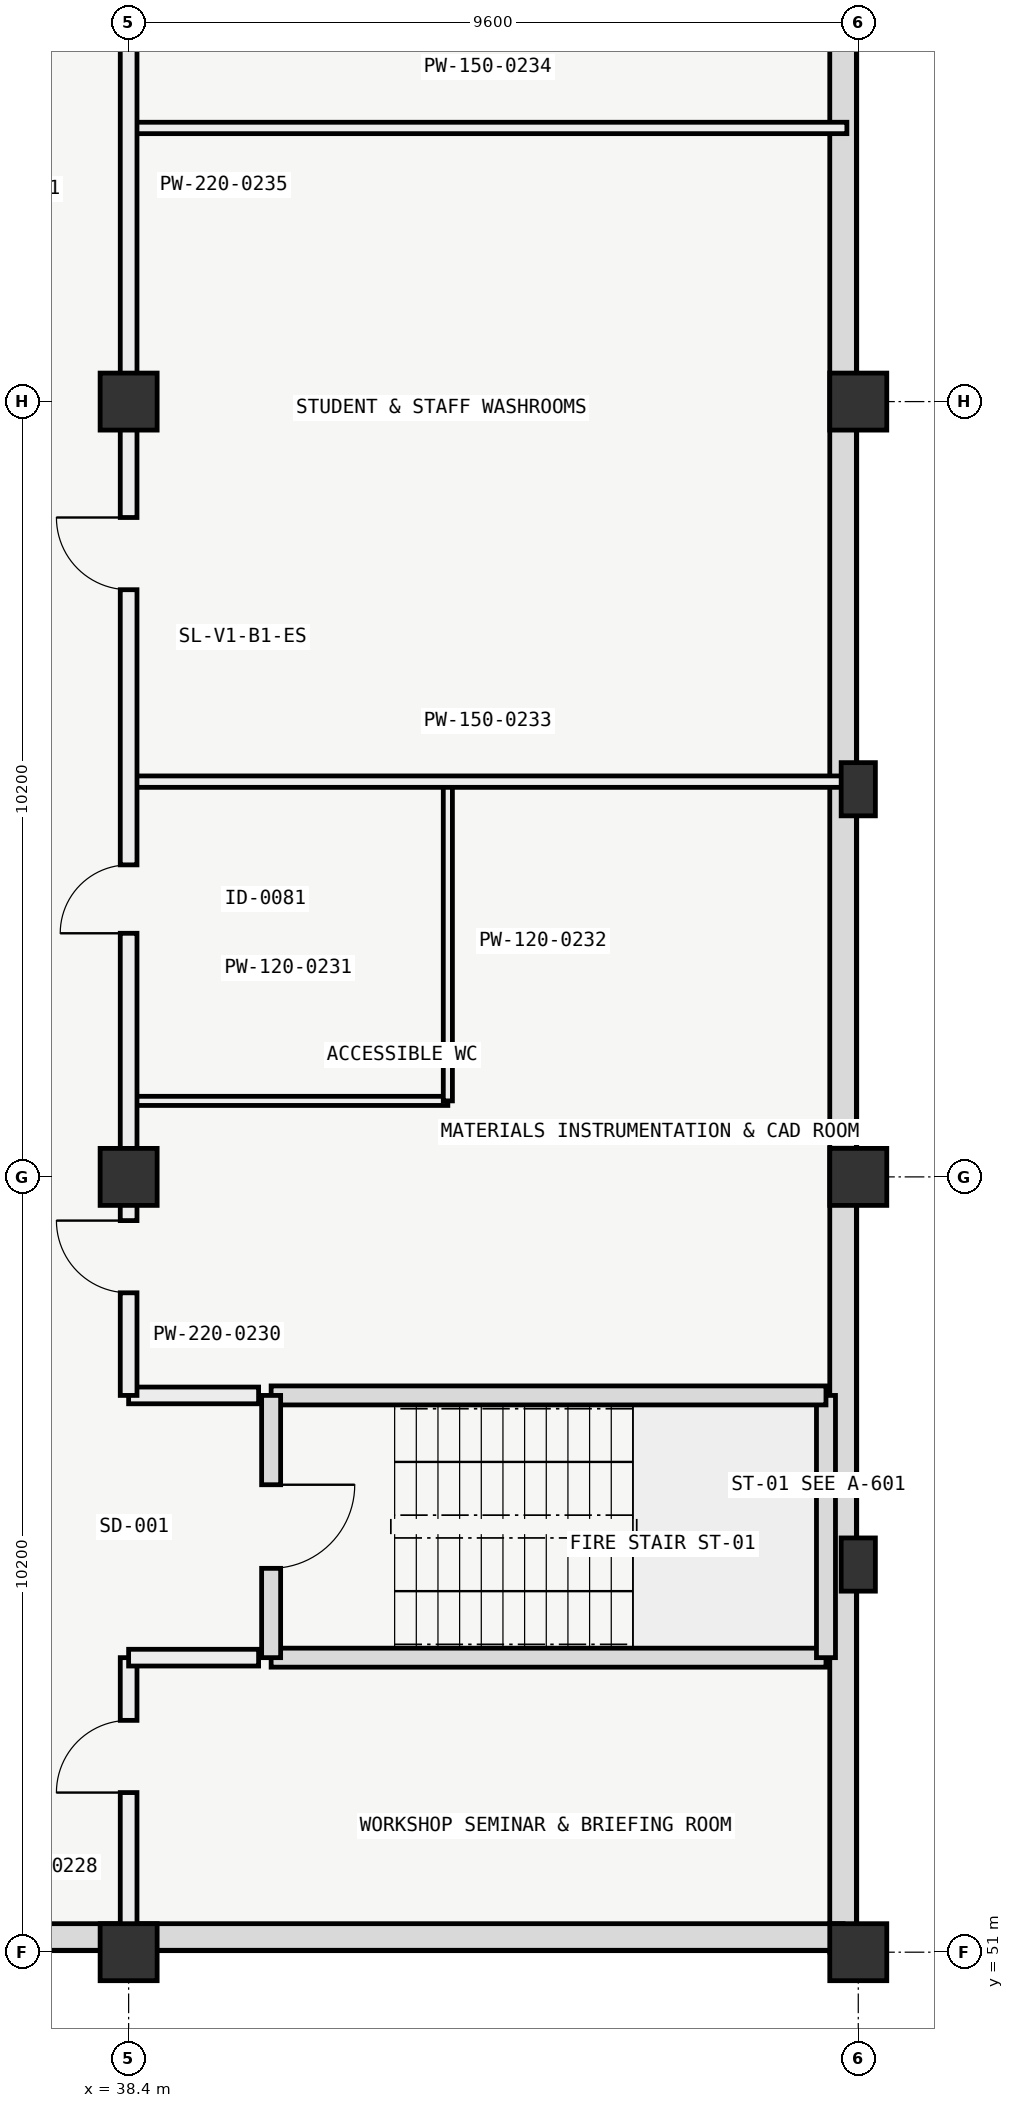
"""IFC4 building model, lengths in metres.
Left out: names, types, materials, properties, quantities, classifications, styles, units other than length and angle.
Written with IfcOpenShell. Run it as: python <this file> out.ifc"""

import sys

from ifc_helpers import new_model, si_unit, direction, frame, frame_2d, origin, origin_2d, place, context, subcontext, project, spatial, rectangle, extrude, element, fill, save


model = new_model("IFC4")
c1 = context("Model", 3, precision=1e-05, world=origin(), true_north=direction((0.0, 1.0)))
c2 = subcontext(c1, "Body", "Model", "MODEL_VIEW")
j1 = project(units=[si_unit("LENGTHUNIT", "METRE"), si_unit("PLANEANGLEUNIT", "RADIAN")], contexts=[c1])
p1 = place(None, origin())
s1 = spatial("IfcSite", under=j1, at=p1, CompositionType="ELEMENT")
p2 = place(p1, origin())
s2 = spatial("IfcBuilding", under=s1, at=p2, CompositionType="ELEMENT")
p3 = place(p2, frame((0.0, 0.0, -4.2)))
s3 = spatial("IfcBuildingStorey", under=s2, at=p3, CompositionType="ELEMENT", Elevation=-4.2)
for number, where, z_axis, x_axis in (
    (1, (38.4, 51.0, 0.0), (0.0, 0.0, 1.0), (1.0, 0.0, 0.0)),
    (2, (48.0, 51.0, 0.0), (0.0, 0.0, 1.0), (1.0, 0.0, 0.0)),
    (3, (38.4, 61.2, 0.0), (0.0, 0.0, 1.0), (1.0, 0.0, 0.0)),
    (4, (48.0, 61.2, 0.0), (0.0, 0.0, 1.0), (1.0, 0.0, 0.0)),
    (5, (38.4, 71.4, 0.0), (0.0, 0.0, 1.0), (1.0, 0.0, 0.0)),
    (6, (48.0, 71.4, 0.0), (0.0, 0.0, 1.0), (1.0, 0.0, 0.0)),
):
    element("IfcColumn", number, at=place(p3, frame(where, z_axis=z_axis, x_axis=x_axis)), inside=s3, PredefinedType="COLUMN", context=c2, shape_type="SweptSolid", body=[
        extrude(rectangle(XDim=0.75, YDim=0.75, at=origin_2d()), origin(), (0.0, 0.0, 1.0), 4.2),
    ])
for number, where, z_axis, x_axis in (
    (7, (48.0, 56.1, 0.0), (0.0, 0.0, 1.0), (1.0, 0.0, 0.0)),
    (8, (48.0, 66.3, 0.0), (0.0, 0.0, 1.0), (1.0, 0.0, 0.0)),
):
    element("IfcColumn", number, at=place(p3, frame(where, z_axis=z_axis, x_axis=x_axis)), inside=s3, PredefinedType="PILASTER", context=c2, shape_type="SweptSolid", body=[
        extrude(rectangle(XDim=0.45, YDim=0.7, at=origin_2d()), origin(), (0.0, 0.0, 1.0), 4.2),
    ])
p4 = place(p3, frame((47.8, 51.0, 0.0), z_axis=(0.0, 0.0, 1.0), x_axis=(0.0, 1.0, 0.0)))
e9 = element("IfcWall", 9, at=p4, inside=s3, PredefinedType="USERDEFINED", context=c2, shape_type="SweptSolid", body=[
    extrude(rectangle(XDim=71.4, YDim=0.35, at=frame_2d((35.7, 0.0))), origin(), (0.0, 0.0, 1.0), 3.9),
])
p5 = place(p3, frame((0.2, 51.2, 0.0), z_axis=(0.0, 0.0, 1.0), x_axis=(1.0, 0.0, 0.0)))
e10 = element("IfcWall", 10, at=p5, inside=s3, PredefinedType="USERDEFINED", context=c2, shape_type="SweptSolid", body=[
    extrude(rectangle(XDim=47.6, YDim=0.35, at=frame_2d((23.8, 0.0))), origin(), (0.0, 0.0, 1.0), 3.9),
])
p6 = place(p3, frame((40.275, 54.875, 0.0), z_axis=(0.0, 0.0, 1.0), x_axis=(1.0, 0.0, 0.0)))
e11 = element("IfcWall", 11, at=p6, inside=s3, PredefinedType="SOLIDWALL", context=c2, shape_type="SweptSolid", body=[
    extrude(rectangle(XDim=7.3, YDim=0.25, at=frame_2d((3.65, 0.0))), origin(), (0.0, 0.0, 1.0), 3.9),
])
p7 = place(p3, frame((47.575, 54.875, 0.0), z_axis=(0.0, 0.0, 1.0), x_axis=(0.0, 1.0, 0.0)))
e12 = element("IfcWall", 12, at=p7, inside=s3, PredefinedType="SOLIDWALL", context=c2, shape_type="SweptSolid", body=[
    extrude(rectangle(XDim=3.45, YDim=0.25, at=frame_2d((1.725, 0.0))), origin(), (0.0, 0.0, 1.0), 3.9),
])
p8 = place(p3, frame((47.575, 58.325, 0.0), z_axis=(0.0, 0.0, 1.0), x_axis=(-1.0, 0.0, 0.0)))
e13 = element("IfcWall", 13, at=p8, inside=s3, PredefinedType="SOLIDWALL", context=c2, shape_type="SweptSolid", body=[
    extrude(rectangle(XDim=7.3, YDim=0.25, at=frame_2d((3.65, 0.0))), origin(), (0.0, 0.0, 1.0), 3.9),
])
p9 = place(p3, frame((40.275, 58.325, 0.0), z_axis=(0.0, 0.0, 1.0), x_axis=(0.0, -1.0, 0.0)))
e14 = element("IfcWall", 14, at=p9, inside=s3, PredefinedType="SOLIDWALL", context=c2, shape_type="SweptSolid", body=[
    extrude(rectangle(XDim=3.45, YDim=0.25, at=frame_2d((1.725, 0.0))), origin(), (0.0, 0.0, 1.0), 3.9),
])
p10 = place(p9, frame((1.175, 0.0, 0.0)))
e15 = element("IfcOpeningElement", 15, at=p10, cuts=e14, PredefinedType="OPENING", context=c2, shape_type="SweptSolid", body=[
    extrude(rectangle(XDim=1.1, YDim=2.2, at=frame_2d((0.55, 1.1))), frame((0.0, 0.135, 0.0), z_axis=(0.0, -1.0, 0.0), x_axis=(1.0, 0.0, 0.0)), (0.0, 0.0, 1.0), 0.27),
])
p11 = place(p3, frame((38.4, 51.15, 0.0), z_axis=(0.0, 0.0, 1.0), x_axis=(0.0, 1.0, 0.0)))
e16 = element("IfcWall", 16, at=p11, inside=s3, PredefinedType="PARTITIONING", context=c2, shape_type="SweptSolid", body=[
    extrude(rectangle(XDim=3.725, YDim=0.22, at=frame_2d((1.863, 0.0))), origin(), (0.0, 0.0, 1.0), 3.423),
])
p12 = place(p11, frame((1.95, 0.0, 0.0)))
e17 = element("IfcOpeningElement", 17, at=p12, cuts=e16, PredefinedType="OPENING", context=c2, shape_type="SweptSolid", body=[
    extrude(rectangle(XDim=0.95, YDim=2.1, at=frame_2d((0.475, 1.05))), frame((0.0, 0.12, 0.0), z_axis=(0.0, -1.0, 0.0), x_axis=(1.0, 0.0, 0.0)), (0.0, 0.0, 1.0), 0.24),
])
for number, where, z_axis, x_axis in (
    (18, (38.4, 54.875, 0.0), (0.0, 0.0, 1.0), (1.0, 0.0, 0.0)),
    (19, (38.4, 58.325, 0.0), (0.0, 0.0, 1.0), (1.0, 0.0, 0.0)),
):
    element("IfcWall", number, at=place(p3, frame(where, z_axis=z_axis, x_axis=x_axis)), inside=s3, PredefinedType="PARTITIONING", context=c2, shape_type="SweptSolid", body=[
        extrude(rectangle(XDim=1.71, YDim=0.22, at=frame_2d((0.855, 0.0))), origin(), (0.0, 0.0, 1.0), 3.423),
    ])
p13 = place(p3, frame((38.4, 62.2, 0.0), z_axis=(0.0, 0.0, 1.0), x_axis=(1.0, 0.0, 0.0)))
e20 = element("IfcWall", 20, at=p13, inside=s3, PredefinedType="PARTITIONING", context=c2, shape_type="SweptSolid", body=[
    extrude(rectangle(XDim=4.2, YDim=0.12, at=frame_2d((2.1, 0.0))), origin(), (0.0, 0.0, 1.0), 3.423),
])
p14 = place(p3, frame((42.6, 62.2, 0.0), z_axis=(0.0, 0.0, 1.0), x_axis=(0.0, 1.0, 0.0)))
e21 = element("IfcWall", 21, at=p14, inside=s3, PredefinedType="PARTITIONING", context=c2, shape_type="SweptSolid", body=[
    extrude(rectangle(XDim=4.2, YDim=0.12, at=frame_2d((2.1, 0.0))), origin(), (0.0, 0.0, 1.0), 3.576),
])
for number, where, z_axis, x_axis in (
    (22, (38.4, 66.4, 0.0), (0.0, 0.0, 1.0), (1.0, 0.0, 0.0)),
    (23, (38.4, 75.0, 0.0), (0.0, 0.0, 1.0), (1.0, 0.0, 0.0)),
):
    element("IfcWall", number, at=place(p3, frame(where, z_axis=z_axis, x_axis=x_axis)), inside=s3, PredefinedType="PARTITIONING", context=c2, shape_type="SweptSolid", body=[
        extrude(rectangle(XDim=9.45, YDim=0.15, at=frame_2d((4.725, 0.0))), origin(), (0.0, 0.0, 1.0), 3.423),
    ])
p15 = place(p3, frame((38.4, 58.325, 0.0), z_axis=(0.0, 0.0, 1.0), x_axis=(0.0, 1.0, 0.0)))
e24 = element("IfcWall", 24, at=p15, inside=s3, PredefinedType="PARTITIONING", context=c2, shape_type="SweptSolid", body=[
    extrude(rectangle(XDim=26.7, YDim=0.22, at=frame_2d((13.35, 0.0))), origin(), (0.0, 0.0, 1.0), 3.268),
])
p16 = place(p15, frame((1.35, 0.0, 0.0)))
e25 = element("IfcOpeningElement", 25, at=p16, cuts=e24, PredefinedType="OPENING", context=c2, shape_type="SweptSolid", body=[
    extrude(rectangle(XDim=0.95, YDim=2.1, at=frame_2d((0.475, 1.05))), frame((0.0, 0.12, 0.0), z_axis=(0.0, -1.0, 0.0), x_axis=(1.0, 0.0, 0.0)), (0.0, 0.0, 1.0), 0.24),
])
p17 = place(p15, frame((6.08, 0.0, 0.0)))
e26 = element("IfcOpeningElement", 26, at=p17, cuts=e24, PredefinedType="OPENING", context=c2, shape_type="SweptSolid", body=[
    extrude(rectangle(XDim=0.9, YDim=2.05, at=frame_2d((0.45, 1.025))), frame((0.0, 0.12, 0.0), z_axis=(0.0, -1.0, 0.0), x_axis=(1.0, 0.0, 0.0)), (0.0, 0.0, 1.0), 0.24),
])
p18 = place(p15, frame((10.6, 0.0, 0.0)))
e27 = element("IfcOpeningElement", 27, at=p18, cuts=e24, PredefinedType="OPENING", context=c2, shape_type="SweptSolid", body=[
    extrude(rectangle(XDim=0.95, YDim=2.1, at=frame_2d((0.475, 1.05))), frame((0.0, 0.12, 0.0), z_axis=(0.0, -1.0, 0.0), x_axis=(1.0, 0.0, 0.0)), (0.0, 0.0, 1.0), 0.24),
])
p19 = place(p15, frame((20.3, 0.0, 0.0)))
e28 = element("IfcOpeningElement", 28, at=p19, cuts=e24, PredefinedType="OPENING", context=c2, shape_type="SweptSolid", body=[
    extrude(rectangle(XDim=0.95, YDim=2.1, at=frame_2d((0.475, 1.05))), frame((0.0, 0.12, 0.0), z_axis=(0.0, -1.0, 0.0), x_axis=(1.0, 0.0, 0.0)), (0.0, 0.0, 1.0), 0.24),
])
p20 = place(p10, origin())
e29 = element("IfcDoor", 29, at=p20, inside=s3, OperationType="SINGLE_SWING_LEFT", PredefinedType="DOOR", context=c2, shape_type="SweptSolid", body=[
    extrude(rectangle(XDim=1.1, YDim=2.2, at=frame_2d((0.55, 1.1))), frame((0.0, 0.025, 0.0), z_axis=(0.0, -1.0, 0.0), x_axis=(1.0, 0.0, 0.0)), (0.0, 0.0, 1.0), 0.05),
])
fill(e15, e29)
p21 = place(p12, origin())
e30 = element("IfcDoor", 30, at=p21, inside=s3, OperationType="SINGLE_SWING_LEFT", PredefinedType="DOOR", context=c2, shape_type="SweptSolid", body=[
    extrude(rectangle(XDim=0.95, YDim=2.1, at=frame_2d((0.475, 1.05))), frame((0.0, 0.025, 0.0), z_axis=(0.0, -1.0, 0.0), x_axis=(1.0, 0.0, 0.0)), (0.0, 0.0, 1.0), 0.05),
])
fill(e17, e30)
p22 = place(p16, origin())
e31 = element("IfcDoor", 31, at=p22, inside=s3, OperationType="SINGLE_SWING_RIGHT", PredefinedType="DOOR", context=c2, shape_type="SweptSolid", body=[
    extrude(rectangle(XDim=0.95, YDim=2.1, at=frame_2d((0.475, 1.05))), frame((0.0, 0.025, 0.0), z_axis=(0.0, -1.0, 0.0), x_axis=(1.0, 0.0, 0.0)), (0.0, 0.0, 1.0), 0.05),
])
fill(e25, e31)
p23 = place(p17, origin())
e32 = element("IfcDoor", 32, at=p23, inside=s3, OperationType="SINGLE_SWING_LEFT", PredefinedType="DOOR", context=c2, shape_type="SweptSolid", body=[
    extrude(rectangle(XDim=0.9, YDim=2.05, at=frame_2d((0.45, 1.025))), frame((0.0, 0.025, 0.0), z_axis=(0.0, -1.0, 0.0), x_axis=(1.0, 0.0, 0.0)), (0.0, 0.0, 1.0), 0.05),
])
fill(e26, e32)
p24 = place(p18, origin())
e33 = element("IfcDoor", 33, at=p24, inside=s3, OperationType="SINGLE_SWING_RIGHT", PredefinedType="DOOR", context=c2, shape_type="SweptSolid", body=[
    extrude(rectangle(XDim=0.95, YDim=2.1, at=frame_2d((0.475, 1.05))), frame((0.0, 0.025, 0.0), z_axis=(0.0, -1.0, 0.0), x_axis=(1.0, 0.0, 0.0)), (0.0, 0.0, 1.0), 0.05),
])
fill(e27, e33)
save(model, sys.argv[1])
